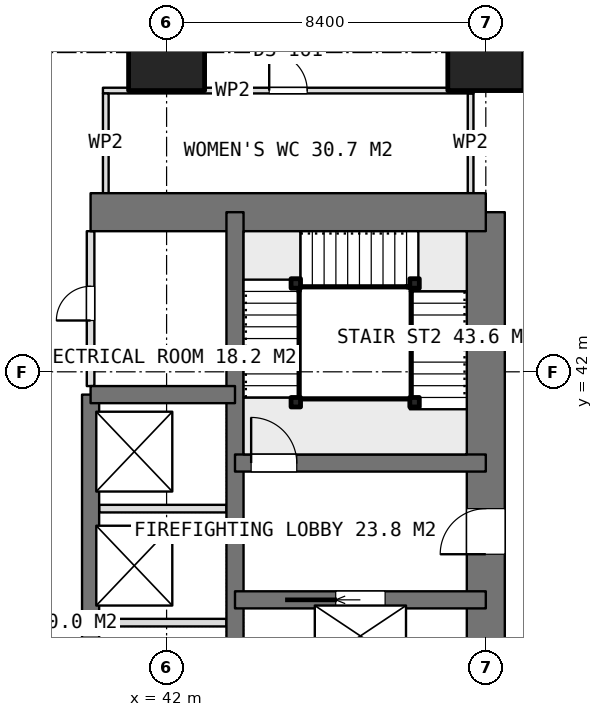
"""IFC4 building model, lengths in metres.
Left out: names, types, materials, properties, quantities, classifications, styles, units other than length and angle.
Written with IfcOpenShell. Run it as: python <this file> out.ifc"""

import sys

from ifc_helpers import new_model, si_unit, direction, frame, frame_2d, origin, origin_2d, place, context, subcontext, project, spatial, rectangle, extrude, element, fill, save


model = new_model("IFC4")
c1 = context("Model", 3, precision=1e-05, world=origin(), true_north=direction((0.0, 1.0)))
c2 = subcontext(c1, "Body", "Model", "MODEL_VIEW")
j1 = project(units=[si_unit("LENGTHUNIT", "METRE"), si_unit("PLANEANGLEUNIT", "RADIAN")], contexts=[c1])
p1 = place(None, origin())
s1 = spatial("IfcSite", under=j1, at=p1, CompositionType="ELEMENT")
p2 = place(p1, origin())
s2 = spatial("IfcBuilding", under=s1, at=p2, CompositionType="ELEMENT")
p3 = place(p2, frame((0.0, 0.0, 147.8)))
s3 = spatial("IfcBuildingStorey", under=s2, at=p3, CompositionType="ELEMENT", Elevation=147.8)
p4 = place(p3, frame((40.0, 46.2, 0.0), z_axis=(0.0, 0.0, 1.0), x_axis=(1.0, 0.0, 0.0)))
e1 = element("IfcWall", 1, at=p4, inside=s3, PredefinedType="SHEAR", context=c2, shape_type="SweptSolid", body=[
    extrude(rectangle(XDim=10.4, YDim=1.0, at=frame_2d((5.2, 0.0))), origin(), (0.0, 0.0, 1.0), 3.75),
])
p5 = place(p3, frame((50.4, 21.0, 0.0), z_axis=(0.0, 0.0, 1.0), x_axis=(0.0, 1.0, 0.0)))
e2 = element("IfcWall", 2, at=p5, inside=s3, PredefinedType="SHEAR", context=c2, shape_type="SweptSolid", body=[
    extrude(rectangle(XDim=25.2, YDim=1.0, at=frame_2d((12.6, 0.0))), origin(), (0.0, 0.0, 1.0), 3.75),
])
p6 = place(p5, frame((16.2, 0.0, 0.0)))
e3 = element("IfcOpeningElement", 3, at=p6, cuts=e2, PredefinedType="OPENING", context=c2, shape_type="SweptSolid", body=[
    extrude(rectangle(XDim=1.2, YDim=2.1, at=frame_2d((0.6, 1.05))), frame((0.0, 0.51, 0.0), z_axis=(0.0, -1.0, 0.0), x_axis=(1.0, 0.0, 0.0)), (0.0, 0.0, 1.0), 1.02),
])
p7 = place(p5, frame((10.05, 0.0, 0.0)))
e4 = element("IfcOpeningElement", 4, at=p7, cuts=e2, PredefinedType="OPENING", context=c2, shape_type="SweptSolid", body=[
    extrude(rectangle(XDim=0.9, YDim=2.1, at=frame_2d((0.45, 1.05))), frame((0.0, 0.51, 0.0), z_axis=(0.0, -1.0, 0.0), x_axis=(1.0, 0.0, 0.0)), (0.0, 0.0, 1.0), 1.02),
])
p8 = place(p5, frame((7.45, 0.0, 0.0)))
e5 = element("IfcOpeningElement", 5, at=p8, cuts=e2, PredefinedType="OPENING", context=c2, shape_type="SweptSolid", body=[
    extrude(rectangle(XDim=0.9, YDim=2.1, at=frame_2d((0.45, 1.05))), frame((0.0, 0.51, 0.0), z_axis=(0.0, -1.0, 0.0), x_axis=(1.0, 0.0, 0.0)), (0.0, 0.0, 1.0), 1.02),
])
p9 = place(p5, frame((0.7, 0.0, 0.0)))
e6 = element("IfcOpeningElement", 6, at=p9, cuts=e2, PredefinedType="OPENING", context=c2, shape_type="SweptSolid", body=[
    extrude(rectangle(XDim=1.2, YDim=2.1, at=frame_2d((0.6, 1.05))), frame((0.0, 0.51, 0.0), z_axis=(0.0, -1.0, 0.0), x_axis=(1.0, 0.0, 0.0)), (0.0, 0.0, 1.0), 1.02),
])
p10 = place(p3, frame((43.8, 21.0, 0.0), z_axis=(0.0, 0.0, 1.0), x_axis=(0.0, 1.0, 0.0)))
e7 = element("IfcWall", 7, at=p10, inside=s3, PredefinedType="SHEAR", context=c2, shape_type="SweptSolid", body=[
    extrude(rectangle(XDim=25.2, YDim=0.45, at=frame_2d((12.6, 0.0))), origin(), (0.0, 0.0, 1.0), 3.75),
])
p11 = place(p3, frame((40.0, 23.4, 0.0), z_axis=(0.0, 0.0, 1.0), x_axis=(0.0, 1.0, 0.0)))
e8 = element("IfcWall", 8, at=p11, inside=s3, PredefinedType="SHEAR", context=c2, shape_type="SweptSolid", body=[
    extrude(rectangle(XDim=18.0, YDim=0.45, at=frame_2d((9.0, 0.0))), origin(), (0.0, 0.0, 1.0), 3.75),
])
p12 = place(p11, frame((2.55, 0.0, 0.0)))
e9 = element("IfcOpeningElement", 9, at=p12, cuts=e8, PredefinedType="OPENING", context=c2, shape_type="SweptSolid", body=[
    extrude(rectangle(XDim=0.9, YDim=2.1, at=frame_2d((0.45, 1.05))), frame((0.0, 0.235, 0.0), z_axis=(0.0, -1.0, 0.0), x_axis=(1.0, 0.0, 0.0)), (0.0, 0.0, 1.0), 0.47),
])
p13 = place(p3, frame((40.0, 41.4, 0.0), z_axis=(0.0, 0.0, 1.0), x_axis=(1.0, 0.0, 0.0)))
e10 = element("IfcWall", 10, at=p13, inside=s3, PredefinedType="SHEAR", context=c2, shape_type="SweptSolid", body=[
    extrude(rectangle(XDim=3.8, YDim=0.45, at=frame_2d((1.9, 0.0))), origin(), (0.0, 0.0, 1.0), 3.75),
])
p14 = place(p3, frame((43.8, 36.0, 0.0), z_axis=(0.0, 0.0, 1.0), x_axis=(1.0, 0.0, 0.0)))
e11 = element("IfcWall", 11, at=p14, inside=s3, PredefinedType="SHEAR", context=c2, shape_type="SweptSolid", body=[
    extrude(rectangle(XDim=6.6, YDim=0.45, at=frame_2d((3.3, 0.0))), origin(), (0.0, 0.0, 1.0), 3.75),
])
p15 = place(p14, frame((2.65, 0.0, 0.0)))
e12 = element("IfcOpeningElement", 12, at=p15, cuts=e11, PredefinedType="OPENING", context=c2, shape_type="SweptSolid", body=[
    extrude(rectangle(XDim=1.3, YDim=2.1, at=frame_2d((0.65, 1.05))), frame((0.0, 0.235, 0.0), z_axis=(0.0, -1.0, 0.0), x_axis=(1.0, 0.0, 0.0)), (0.0, 0.0, 1.0), 0.47),
])
p16 = place(p3, frame((43.8, 39.6, 0.0), z_axis=(0.0, 0.0, 1.0), x_axis=(1.0, 0.0, 0.0)))
e13 = element("IfcWall", 13, at=p16, inside=s3, PredefinedType="SHEAR", context=c2, shape_type="SweptSolid", body=[
    extrude(rectangle(XDim=6.6, YDim=0.45, at=frame_2d((3.3, 0.0))), origin(), (0.0, 0.0, 1.0), 3.75),
])
p17 = place(p16, frame((0.425, 0.0, 0.0)))
e14 = element("IfcOpeningElement", 14, at=p17, cuts=e13, PredefinedType="OPENING", context=c2, shape_type="SweptSolid", body=[
    extrude(rectangle(XDim=1.2, YDim=2.1, at=frame_2d((0.6, 1.05))), frame((0.0, 0.235, 0.0), z_axis=(0.0, -1.0, 0.0), x_axis=(1.0, 0.0, 0.0)), (0.0, 0.0, 1.0), 0.47),
])
for number, where, z_axis, x_axis in (
    (15, (42.0, 50.4, 0.0), (0.0, 0.0, 1.0), (1.0, 0.0, 0.0)),
    (16, (50.4, 50.4, 0.0), (0.0, 0.0, 1.0), (1.0, 0.0, 0.0)),
):
    element("IfcColumn", number, at=place(p3, frame(where, z_axis=z_axis, x_axis=x_axis)), inside=s3, PredefinedType="COLUMN", context=c2, shape_type="SweptSolid", body=[
        extrude(rectangle(XDim=2.0, YDim=2.0, at=origin_2d()), origin(), (0.0, 0.0, 1.0), 3.75),
    ])
for number, where, z_axis, x_axis in (
    (17, (40.225, 35.4, 0.0), (0.0, 0.0, 1.0), (1.0, 0.0, 0.0)),
    (18, (40.225, 38.4, 0.0), (0.0, 0.0, 1.0), (1.0, 0.0, 0.0)),
):
    element("IfcWall", number, at=place(p3, frame(where, z_axis=z_axis, x_axis=x_axis)), inside=s3, PredefinedType="PARTITIONING", context=c2, shape_type="SweptSolid", body=[
        extrude(rectangle(XDim=3.35, YDim=0.2, at=frame_2d((1.675, 0.0))), origin(), (0.0, 0.0, 1.0), 3.5),
    ])
p18 = place(p3, frame((40.0, 41.625, 0.0), z_axis=(0.0, 0.0, 1.0), x_axis=(0.0, 1.0, 0.0)))
e19 = element("IfcWall", 19, at=p18, inside=s3, PredefinedType="PARTITIONING", context=c2, shape_type="SweptSolid", body=[
    extrude(rectangle(XDim=4.075, YDim=0.2, at=frame_2d((2.038, 0.0))), origin(), (0.0, 0.0, 1.0), 3.5),
])
p19 = place(p18, frame((1.725, 0.0, 0.0)))
e20 = element("IfcOpeningElement", 20, at=p19, cuts=e19, PredefinedType="OPENING", context=c2, shape_type="SweptSolid", body=[
    extrude(rectangle(XDim=0.9, YDim=2.1, at=frame_2d((0.45, 1.05))), frame((0.0, 0.11, 0.0), z_axis=(0.0, -1.0, 0.0), x_axis=(1.0, 0.0, 0.0)), (0.0, 0.0, 1.0), 0.22),
])
p20 = place(p3, frame((40.325, 49.4, 0.0), z_axis=(0.0, 0.0, 1.0), x_axis=(1.0, 0.0, 0.0)))
e21 = element("IfcWall", 21, at=p20, inside=s3, PredefinedType="PARTITIONING", context=c2, shape_type="SweptSolid", body=[
    extrude(rectangle(XDim=9.75, YDim=0.15, at=frame_2d((4.875, 0.0))), origin(), (0.0, 0.0, 1.0), 3.5),
])
p21 = place(p20, frame((4.375, 0.0, 0.0)))
e22 = element("IfcOpeningElement", 22, at=p21, cuts=e21, PredefinedType="OPENING", context=c2, shape_type="SweptSolid", body=[
    extrude(rectangle(XDim=1.0, YDim=2.1, at=frame_2d((0.5, 1.05))), frame((0.0, 0.085, 0.0), z_axis=(0.0, -1.0, 0.0), x_axis=(1.0, 0.0, 0.0)), (0.0, 0.0, 1.0), 0.17),
])
for number, where, z_axis, x_axis in (
    (23, (40.4, 46.7, 0.0), (0.0, 0.0, 1.0), (0.0, 1.0, 0.0)),
    (24, (50.0, 46.7, 0.0), (0.0, 0.0, 1.0), (0.0, 1.0, 0.0)),
):
    element("IfcWall", number, at=place(p3, frame(where, z_axis=z_axis, x_axis=x_axis)), inside=s3, PredefinedType="PARTITIONING", context=c2, shape_type="SweptSolid", body=[
        extrude(rectangle(XDim=2.625, YDim=0.15, at=frame_2d((1.312, 0.0))), origin(), (0.0, 0.0, 1.0), 3.5),
    ])
for number, where, z_axis, x_axis in (
    (25, (45.4, 41.2, 0.0), (0.0, 0.0, 1.0), (1.0, 0.0, 0.0)),
    (26, (45.4, 44.325, 0.0), (0.0, 0.0, 1.0), (1.0, 0.0, 0.0)),
    (27, (48.525, 44.325, 0.0), (0.0, 0.0, 1.0), (1.0, 0.0, 0.0)),
    (28, (48.525, 41.2, 0.0), (0.0, 0.0, 1.0), (1.0, 0.0, 0.0)),
):
    element("IfcColumn", number, at=place(p3, frame(where, z_axis=z_axis, x_axis=x_axis)), inside=s3, PredefinedType="COLUMN", context=c2, shape_type="SweptSolid", body=[
        extrude(rectangle(XDim=0.25, YDim=0.25, at=origin_2d()), origin(), (0.0, 0.0, 1.0), 3.75),
    ])
p22 = place(p6, origin())
e29 = element("IfcDoor", 29, at=p22, inside=s3, OperationType="SINGLE_SWING_LEFT", PredefinedType="DOOR", context=c2, shape_type="SweptSolid", body=[
    extrude(rectangle(XDim=1.2, YDim=2.1, at=frame_2d((0.6, 1.05))), frame((0.0, 0.025, 0.0), z_axis=(0.0, -1.0, 0.0), x_axis=(1.0, 0.0, 0.0)), (0.0, 0.0, 1.0), 0.05),
])
fill(e3, e29)
p23 = place(p19, origin())
e30 = element("IfcDoor", 30, at=p23, inside=s3, OperationType="SINGLE_SWING_LEFT", PredefinedType="DOOR", context=c2, shape_type="SweptSolid", body=[
    extrude(rectangle(XDim=0.9, YDim=2.1, at=frame_2d((0.45, 1.05))), frame((0.0, 0.025, 0.0), z_axis=(0.0, -1.0, 0.0), x_axis=(1.0, 0.0, 0.0)), (0.0, 0.0, 1.0), 0.05),
])
fill(e20, e30)
p24 = place(p15, origin())
e31 = element("IfcDoor", 31, at=p24, inside=s3, OperationType="SLIDING_TO_LEFT", PredefinedType="USERDEFINED", context=c2, shape_type="SweptSolid", body=[
    extrude(rectangle(XDim=1.3, YDim=2.1, at=frame_2d((0.65, 1.05))), frame((0.0, 0.025, 0.0), z_axis=(0.0, -1.0, 0.0), x_axis=(1.0, 0.0, 0.0)), (0.0, 0.0, 1.0), 0.05),
])
fill(e12, e31)
p25 = place(p21, origin())
e32 = element("IfcDoor", 32, at=p25, inside=s3, OperationType="SINGLE_SWING_LEFT", PredefinedType="DOOR", context=c2, shape_type="SweptSolid", body=[
    extrude(rectangle(XDim=1.0, YDim=2.1, at=frame_2d((0.5, 1.05))), frame((0.0, 0.025, 0.0), z_axis=(0.0, -1.0, 0.0), x_axis=(1.0, 0.0, 0.0)), (0.0, 0.0, 1.0), 0.05),
])
fill(e22, e32)
p26 = place(p17, origin())
e33 = element("IfcDoor", 33, at=p26, inside=s3, OperationType="SINGLE_SWING_RIGHT", PredefinedType="DOOR", context=c2, shape_type="SweptSolid", body=[
    extrude(rectangle(XDim=1.2, YDim=2.1, at=frame_2d((0.6, 1.05))), frame((0.0, 0.025, 0.0), z_axis=(0.0, -1.0, 0.0), x_axis=(1.0, 0.0, 0.0)), (0.0, 0.0, 1.0), 0.05),
])
fill(e14, e33)
save(model, sys.argv[1])
